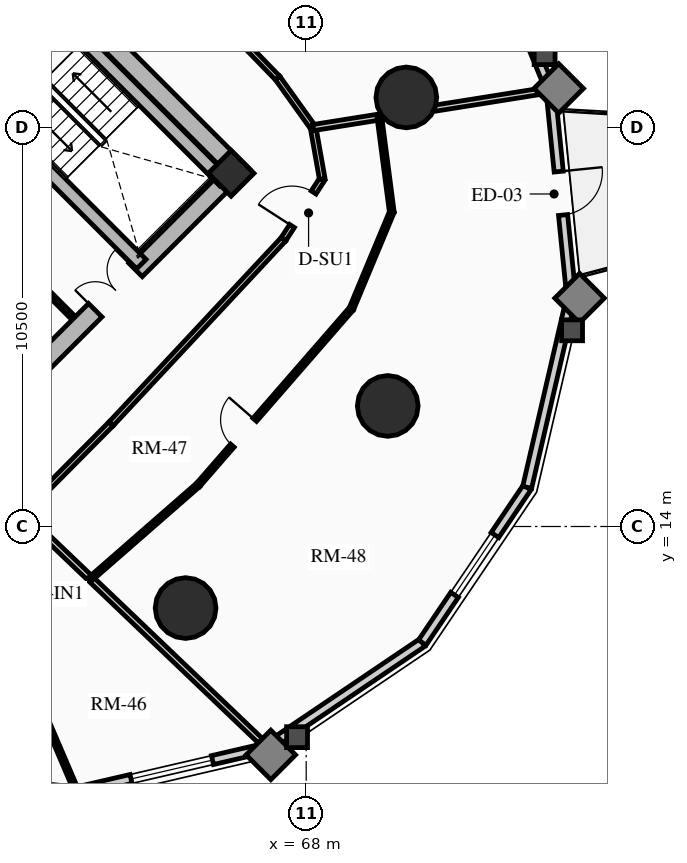
"""IFC4 building model, lengths in metres.
Left out: names, types, materials, properties, quantities, classifications, styles, units other than length and angle.
Written with IfcOpenShell. Run it as: python <this file> out.ifc"""

import sys

from ifc_helpers import new_model, si_unit, direction, frame, frame_2d, origin, origin_2d, place, context, subcontext, project, spatial, rectangle, circle, extrude, source, transform, mapped, element, fill, save


model = new_model("IFC4")
c1 = context("Model", 3, precision=1e-05, world=origin(), true_north=direction((0.0, 1.0)))
c2 = subcontext(c1, "Body", "Model", "MODEL_VIEW")
j1 = project(units=[si_unit("LENGTHUNIT", "METRE"), si_unit("PLANEANGLEUNIT", "RADIAN")], contexts=[c1])
p1 = place(None, origin())
s1 = spatial("IfcSite", under=j1, at=p1, CompositionType="ELEMENT")
p2 = place(p1, origin())
s2 = spatial("IfcBuilding", under=s1, at=p2, CompositionType="ELEMENT")
p3 = place(p2, frame((0.0, 0.0, 48.19)))
s3 = spatial("IfcBuildingStorey", under=s2, at=p3, CompositionType="ELEMENT", Elevation=48.19)
p4 = place(p3, frame((66.339, 23.227, 0.0), z_axis=(0.0, 0.0, 1.0), x_axis=(-0.707106781187, 0.707106781187, 0.0)))
e1 = element("IfcWall", 1, at=p4, inside=s3, PredefinedType="SHEAR", context=c2, shape_type="SweptSolid", body=[
    extrude(rectangle(XDim=14.3, YDim=0.5, at=frame_2d((7.15, 0.0))), origin(), (0.0, 0.0, 1.0), 2.91),
])
p5 = place(p3, frame((58.596, 15.838, 0.0), z_axis=(0.0, 0.0, 1.0), x_axis=(0.707106781187, 0.707106781187, 0.0)))
e2 = element("IfcWall", 2, at=p5, inside=s3, PredefinedType="SHEAR", context=c2, shape_type="SweptSolid", body=[
    extrude(rectangle(XDim=10.7, YDim=0.5, at=frame_2d((5.35, 0.0))), origin(), (0.0, 0.0, 1.0), 2.91),
])
m1 = source(origin(), c2, "Body", "SweptSolid", [
    extrude(rectangle(XDim=1.5, YDim=2.02, at=frame_2d((0.75, 1.01))), frame((0.0, 0.26, 0.0), z_axis=(0.0, -1.0, 0.0), x_axis=(1.0, 0.0, 0.0)), (0.0, 0.0, 1.0), 0.52),
])
p6 = place(p5, frame((5.45, 0.0, 0.0)))
e3 = element("IfcOpeningElement", 3, at=p6, cuts=e2, PredefinedType="OPENING", context=c2, shape_type="MappedRepresentation", body=[
    mapped(m1, transform((0.0, 0.0, 0.0), x_axis=(1.0, 0.0, 0.0), y_axis=(0.0, 1.0, 0.0), z_axis=(0.0, 0.0, 1.0), scale=1.0)),
])
p7 = place(p3, frame((63.662, 20.904, 0.0), z_axis=(0.0, 0.0, 1.0), x_axis=(-0.707106781187, 0.707106781187, 0.0)))
e4 = element("IfcWall", 4, at=p7, inside=s3, PredefinedType="SHEAR", context=c2, shape_type="SweptSolid", body=[
    extrude(rectangle(XDim=13.8, YDim=0.35, at=frame_2d((6.9, 0.0))), origin(), (0.0, 0.0, 1.0), 2.91),
])
m2 = source(origin(), c2, "Body", "SweptSolid", [
    extrude(rectangle(XDim=1.1, YDim=2.015, at=frame_2d((0.55, 1.007))), frame((0.0, 0.185, 0.0), z_axis=(0.0, -1.0, 0.0), x_axis=(1.0, 0.0, 0.0)), (0.0, 0.0, 1.0), 0.37),
])
p8 = place(p7, frame((10.025, 0.0, 0.0)))
e5 = element("IfcOpeningElement", 5, at=p8, cuts=e4, PredefinedType="OPENING", context=c2, shape_type="MappedRepresentation", body=[
    mapped(m2, transform((0.0, 0.0, 0.0), x_axis=(1.0, 0.0, 0.0), y_axis=(0.0, 1.0, 0.0), z_axis=(0.0, 0.0, 1.0), scale=1.0)),
])
p9 = place(p7, frame((12.025, 0.0, 0.0)))
e6 = element("IfcOpeningElement", 6, at=p9, cuts=e4, PredefinedType="OPENING", context=c2, shape_type="MappedRepresentation", body=[
    mapped(m2, transform((0.0, 0.0, 0.0), x_axis=(1.0, 0.0, 0.0), y_axis=(0.0, 1.0, 0.0), z_axis=(0.0, 0.0, 1.0), scale=1.0)),
])
m3 = source(origin(), c2, "Body", "SweptSolid", [
    extrude(rectangle(XDim=1.15, YDim=2.02, at=frame_2d((0.575, 1.01))), frame((0.0, 0.185, 0.0), z_axis=(0.0, -1.0, 0.0), x_axis=(1.0, 0.0, 0.0)), (0.0, 0.0, 1.0), 0.37),
])
p10 = place(p7, frame((5.33, 0.0, 0.0)))
e7 = element("IfcOpeningElement", 7, at=p10, cuts=e4, PredefinedType="OPENING", context=c2, shape_type="MappedRepresentation", body=[
    mapped(m3, transform((0.0, 0.0, 0.0), x_axis=(1.0, 0.0, 0.0), y_axis=(0.0, 1.0, 0.0), z_axis=(0.0, 0.0, 1.0), scale=1.0)),
])
p11 = place(p3, frame((65.847, 23.089, 0.0), z_axis=(0.0, 0.0, 1.0), x_axis=(-0.707106781187, 0.707106781187, 0.0)))
e8 = element("IfcWall", 8, at=p11, inside=s3, PredefinedType="SHEAR", context=c2, shape_type="SweptSolid", body=[
    extrude(rectangle(XDim=6.745, YDim=0.35, at=frame_2d((3.373, 0.0))), origin(), (0.0, 0.0, 1.0), 2.91),
])
p12 = place(p3, frame((58.893, 25.674, 0.0), z_axis=(0.0, 0.0, 1.0), x_axis=(0.707106781187, 0.707106781187, 0.0)))
e9 = element("IfcWall", 9, at=p12, inside=s3, PredefinedType="SHEAR", context=c2, shape_type="SweptSolid", body=[
    extrude(rectangle(XDim=3.285, YDim=0.35, at=frame_2d((1.643, 0.0))), origin(), (0.0, 0.0, 1.0), 2.91),
])
p13 = place(p3, frame((66.024, 23.294, 0.0), z_axis=(0.0, 0.0, 1.0), x_axis=(0.707106781187, 0.707106781187, 0.0)))
e10 = element("IfcColumn", 10, at=p13, inside=s3, PredefinedType="COLUMN", context=c2, shape_type="SweptSolid", body=[
    extrude(rectangle(XDim=0.85, YDim=0.85, at=origin_2d()), origin(), (0.0, 0.0, 1.0), 2.91),
])
for number, where, z_axis, x_axis in (
    (11, (64.827, 11.854, 0.0), (0.0, 0.0, 1.0), (1.0, 0.0, 0.0)),
    (12, (70.146, 17.173, 0.0), (0.0, 0.0, 1.0), (1.0, 0.0, 0.0)),
    (13, (70.635, 25.291, 0.0), (0.0, 0.0, 1.0), (1.0, 0.0, 0.0)),
):
    element("IfcColumn", number, at=place(p3, frame(where, z_axis=z_axis, x_axis=x_axis)), inside=s3, PredefinedType="USERDEFINED", context=c2, shape_type="SweptSolid", body=[
        extrude(circle(Radius=0.8, at=origin_2d()), origin(), (0.0, 0.0, 1.0), 2.91),
    ])
p14 = place(p3, frame((61.957, 7.024, 0.0), z_axis=(0.0, 0.0, 1.0), x_axis=(-0.994970765694, 0.100165739718, 0.0)))
e14 = element("IfcWall", 14, at=p14, inside=s3, PredefinedType="SOLIDWALL", context=c2, shape_type="SweptSolid", body=[
    extrude(rectangle(XDim=5.477, YDim=0.24, at=frame_2d((2.738, 0.0))), origin(), (0.0, 0.0, 1.0), 2.073),
])
m4 = source(origin(), c2, "Body", "SweptSolid", [
    extrude(rectangle(XDim=1.9, YDim=1.35, at=frame_2d((0.95, 0.675))), frame((0.0, 0.13, 0.0), z_axis=(0.0, -1.0, 0.0), x_axis=(1.0, 0.0, 0.0)), (0.0, 0.0, 1.0), 0.26),
])
p15 = place(p14, frame((1.788, 0.0, 0.65)))
e15 = element("IfcOpeningElement", 15, at=p15, cuts=e14, PredefinedType="OPENING", context=c2, shape_type="MappedRepresentation", body=[
    mapped(m4, transform((0.0, 0.0, 0.0), x_axis=(1.0, 0.0, 0.0), y_axis=(0.0, 1.0, 0.0), z_axis=(0.0, 0.0, 1.0), scale=1.0)),
])
p16 = place(p3, frame((66.969, 8.186, 0.0), z_axis=(0.0, 0.0, 1.0), x_axis=(-0.974166016949, -0.225833060959, 0.0)))
e16 = element("IfcWall", 16, at=p16, inside=s3, PredefinedType="SOLIDWALL", context=c2, shape_type="SweptSolid", body=[
    extrude(rectangle(XDim=5.146, YDim=0.24, at=frame_2d((2.573, 0.0))), origin(), (0.0, 0.0, 1.0), 2.073),
])
m5 = source(origin(), c2, "Body", "SweptSolid", [
    extrude(rectangle(XDim=2.2, YDim=1.35, at=frame_2d((1.1, 0.675))), frame((0.0, 0.13, 0.0), z_axis=(0.0, -1.0, 0.0), x_axis=(1.0, 0.0, 0.0)), (0.0, 0.0, 1.0), 0.26),
])
p17 = place(p16, frame((1.473, 0.0, 0.65)))
e17 = element("IfcOpeningElement", 17, at=p17, cuts=e16, PredefinedType="OPENING", context=c2, shape_type="MappedRepresentation", body=[
    mapped(m5, transform((0.0, 0.0, 0.0), x_axis=(1.0, 0.0, 0.0), y_axis=(0.0, 1.0, 0.0), z_axis=(0.0, 0.0, 1.0), scale=1.0)),
])
p18 = place(p3, frame((71.055, 10.945, 0.0), z_axis=(0.0, 0.0, 1.0), x_axis=(-0.828736708604, -0.559638693991, 0.0)))
e18 = element("IfcWall", 18, at=p18, inside=s3, PredefinedType="SOLIDWALL", context=c2, shape_type="SweptSolid", body=[
    extrude(rectangle(XDim=4.93, YDim=0.24, at=frame_2d((2.465, 0.0))), origin(), (0.0, 0.0, 1.0), 2.073),
])
p19 = place(p3, frame((73.814, 15.031, 0.0), z_axis=(0.0, 0.0, 1.0), x_axis=(-0.559638693991, -0.828736708604, 0.0)))
e19 = element("IfcWall", 19, at=p19, inside=s3, PredefinedType="SOLIDWALL", context=c2, shape_type="SweptSolid", body=[
    extrude(rectangle(XDim=4.93, YDim=0.24, at=frame_2d((2.465, 0.0))), origin(), (0.0, 0.0, 1.0), 2.073),
])
p20 = place(p19, frame((1.515, 0.0, 0.65)))
e20 = element("IfcOpeningElement", 20, at=p20, cuts=e19, PredefinedType="OPENING", context=c2, shape_type="MappedRepresentation", body=[
    mapped(m4, transform((0.0, 0.0, 0.0), x_axis=(1.0, 0.0, 0.0), y_axis=(0.0, 1.0, 0.0), z_axis=(0.0, 0.0, 1.0), scale=1.0)),
])
p21 = place(p3, frame((74.976, 20.043, 0.0), z_axis=(0.0, 0.0, 1.0), x_axis=(-0.225833060959, -0.974166016949, 0.0)))
e21 = element("IfcWall", 21, at=p21, inside=s3, PredefinedType="SOLIDWALL", context=c2, shape_type="SweptSolid", body=[
    extrude(rectangle(XDim=5.146, YDim=0.24, at=frame_2d((2.573, 0.0))), origin(), (0.0, 0.0, 1.0), 2.073),
])
p22 = place(p3, frame((74.428, 25.493, 0.0), z_axis=(0.0, 0.0, 1.0), x_axis=(0.100165739718, -0.994970765694, 0.0)))
e22 = element("IfcWall", 22, at=p22, inside=s3, PredefinedType="SOLIDWALL", context=c2, shape_type="SweptSolid", body=[
    extrude(rectangle(XDim=5.477, YDim=0.24, at=frame_2d((2.738, 0.0))), origin(), (0.0, 0.0, 1.0), 2.073),
])
m6 = source(origin(), c2, "Body", "SweptSolid", [
    extrude(rectangle(XDim=1.15, YDim=2.005, at=frame_2d((0.575, 1.002))), frame((0.0, 0.13, 0.0), z_axis=(0.0, -1.0, 0.0), x_axis=(1.0, 0.0, 0.0)), (0.0, 0.0, 1.0), 0.26),
])
p23 = place(p22, frame((2.163, 0.0, 0.0)))
e23 = element("IfcOpeningElement", 23, at=p23, cuts=e22, PredefinedType="OPENING", context=c2, shape_type="MappedRepresentation", body=[
    mapped(m6, transform((0.0, 0.0, 0.0), x_axis=(1.0, 0.0, 0.0), y_axis=(0.0, 1.0, 0.0), z_axis=(0.0, 0.0, 1.0), scale=1.0)),
])
p24 = place(p3, frame((72.222, 30.844, 0.0), z_axis=(0.0, 0.0, 1.0), x_axis=(0.381027682565, -0.924563629567, 0.0)))
e24 = element("IfcWall", 24, at=p24, inside=s3, PredefinedType="SOLIDWALL", context=c2, shape_type="SweptSolid", body=[
    extrude(rectangle(XDim=5.789, YDim=0.24, at=frame_2d((2.894, 0.0))), origin(), (0.0, 0.0, 1.0), 2.073),
])
p25 = place(p3, frame((61.835, 19.529, 0.0), z_axis=(0.0, 0.0, 1.0), x_axis=(-0.707146413884, 0.707067146267, 0.0)))
e25 = element("IfcWall", 25, at=p25, inside=s3, PredefinedType="PARTITIONING", context=c2, shape_type="SweptSolid", body=[
    extrude(rectangle(XDim=3.08, YDim=0.125, at=frame_2d((1.54, 0.0))), origin(), (0.0, 0.0, 1.0), 2.635),
])
m7 = source(origin(), c2, "Body", "SweptSolid", [
    extrude(rectangle(XDim=0.9, YDim=2.005, at=frame_2d((0.45, 1.002))), frame((0.0, 0.073, 0.0), z_axis=(0.0, -1.0, 0.0), x_axis=(1.0, 0.0, 0.0)), (0.0, 0.0, 1.0), 0.145),
])
p26 = place(p25, frame((1.05, 0.0, 0.0)))
e26 = element("IfcOpeningElement", 26, at=p26, cuts=e25, PredefinedType="OPENING", context=c2, shape_type="MappedRepresentation", body=[
    mapped(m7, transform((0.0, 0.0, 0.0), x_axis=(1.0, 0.0, 0.0), y_axis=(0.0, 1.0, 0.0), z_axis=(0.0, 0.0, 1.0), scale=1.0)),
])
p27 = place(p3, frame((60.528, 14.344, 0.0), z_axis=(0.0, 0.0, 1.0), x_axis=(0.704381645997, 0.709821454158, 0.0)))
e27 = element("IfcWall", 27, at=p27, inside=s3, PredefinedType="PARTITIONING", context=c2, shape_type="SweptSolid", body=[
    extrude(rectangle(XDim=3.321, YDim=0.15, at=frame_2d((1.661, 0.0))), origin(), (0.0, 0.0, 1.0), 2.159),
])
p28 = place(p3, frame((62.867, 16.702, 0.0), z_axis=(0.0, 0.0, 1.0), x_axis=(0.682449206191, 0.73093302085, 0.0)))
e28 = element("IfcWall", 28, at=p28, inside=s3, PredefinedType="PARTITIONING", context=c2, shape_type="SweptSolid", body=[
    extrude(rectangle(XDim=6.642, YDim=0.15, at=frame_2d((3.321, 0.0))), origin(), (0.0, 0.0, 1.0), 2.159),
])
p29 = place(p3, frame((67.4, 21.556, 0.0), z_axis=(0.0, 0.0, 1.0), x_axis=(0.542247692187, 0.840218686009, 0.0)))
e29 = element("IfcWall", 29, at=p29, inside=s3, PredefinedType="PARTITIONING", context=c2, shape_type="SweptSolid", body=[
    extrude(rectangle(XDim=1.887, YDim=0.15, at=frame_2d((0.943, 0.0))), origin(), (0.0, 0.0, 1.0), 2.205),
])
m8 = source(origin(), c2, "Body", "SweptSolid", [
    extrude(rectangle(XDim=1.05, YDim=2.015, at=frame_2d((0.525, 1.007))), frame((0.0, 0.085, 0.0), z_axis=(0.0, -1.0, 0.0), x_axis=(1.0, 0.0, 0.0)), (0.0, 0.0, 1.0), 0.17),
])
p30 = place(p29, frame((0.419, 0.0, 0.0)))
e30 = element("IfcOpeningElement", 30, at=p30, cuts=e29, PredefinedType="OPENING", context=c2, shape_type="MappedRepresentation", body=[
    mapped(m8, transform((0.0, 0.0, 0.0), x_axis=(1.0, 0.0, 0.0), y_axis=(0.0, 1.0, 0.0), z_axis=(0.0, 0.0, 1.0), scale=1.0)),
])
p31 = place(p3, frame((68.423, 23.142, 0.0), z_axis=(0.0, 0.0, 1.0), x_axis=(-0.174796562349, 0.984604571283, 0.0)))
e31 = element("IfcWall", 31, at=p31, inside=s3, PredefinedType="PARTITIONING", context=c2, shape_type="SweptSolid", body=[
    extrude(rectangle(XDim=1.377, YDim=0.15, at=frame_2d((0.688, 0.0))), origin(), (0.0, 0.0, 1.0), 2.159),
])
p32 = place(p3, frame((68.182, 24.498, 0.0), z_axis=(0.0, 0.0, 1.0), x_axis=(-0.582532339525, 0.812807525437, 0.0)))
e32 = element("IfcWall", 32, at=p32, inside=s3, PredefinedType="PARTITIONING", context=c2, shape_type="SweptSolid", body=[
    extrude(rectangle(XDim=1.605, YDim=0.15, at=frame_2d((0.803, 0.0))), origin(), (0.0, 0.0, 1.0), 2.205),
])
p33 = place(p3, frame((67.247, 25.802, 0.0), z_axis=(0.0, 0.0, 1.0), x_axis=(-0.696771261687, 0.71729339108, 0.0)))
e33 = element("IfcWall", 33, at=p33, inside=s3, PredefinedType="PARTITIONING", context=c2, shape_type="SweptSolid", body=[
    extrude(rectangle(XDim=5.972, YDim=0.15, at=frame_2d((2.986, 0.0))), origin(), (0.0, 0.0, 1.0), 2.635),
])
m9 = source(origin(), c2, "Body", "SweptSolid", [
    extrude(rectangle(XDim=1.0, YDim=2.015, at=frame_2d((0.5, 1.007))), frame((0.0, 0.085, 0.0), z_axis=(0.0, -1.0, 0.0), x_axis=(1.0, 0.0, 0.0)), (0.0, 0.0, 1.0), 0.17),
])
p34 = place(p33, frame((2.486, 0.0, 0.0)))
e34 = element("IfcOpeningElement", 34, at=p34, cuts=e33, PredefinedType="OPENING", context=c2, shape_type="MappedRepresentation", body=[
    mapped(m9, transform((0.0, 0.0, 0.0), x_axis=(1.0, 0.0, 0.0), y_axis=(0.0, 1.0, 0.0), z_axis=(0.0, 0.0, 1.0), scale=1.0)),
])
p35 = place(p3, frame((60.528, 14.344, 0.0), z_axis=(0.0, 0.0, 1.0), x_axis=(0.723320016743, -0.690512963947, 0.0)))
e35 = element("IfcWall", 35, at=p35, inside=s3, PredefinedType="PARTITIONING", context=c2, shape_type="SweptSolid", body=[
    extrude(rectangle(XDim=8.893, YDim=0.16, at=frame_2d((4.446, 0.0))), origin(), (0.0, 0.0, 1.0), 2.073),
])
p36 = place(p3, frame((68.182, 24.498, 0.0), z_axis=(0.0, 0.0, 1.0), x_axis=(0.987550107246, 0.157304754152, 0.0)))
e36 = element("IfcWall", 36, at=p36, inside=s3, PredefinedType="PARTITIONING", context=c2, shape_type="SweptSolid", body=[
    extrude(rectangle(XDim=6.304, YDim=0.16, at=frame_2d((3.152, 0.0))), origin(), (0.0, 0.0, 1.0), 2.073),
])
p37 = place(p3, frame((58.975, 13.996, 0.0), z_axis=(0.0, 0.0, 1.0), x_axis=(0.393755664375, -0.919215141723, 0.0)))
e37 = element("IfcWall", 37, at=p37, inside=s3, PredefinedType="PARTITIONING", context=c2, shape_type="SweptSolid", body=[
    extrude(rectangle(XDim=7.563, YDim=0.125, at=frame_2d((3.782, 0.0))), origin(), (0.0, 0.0, 1.0), 2.073),
])
p38 = place(p37, frame((1.8, 0.0, 0.0)))
e38 = element("IfcOpeningElement", 38, at=p38, cuts=e37, PredefinedType="OPENING", context=c2, shape_type="MappedRepresentation", body=[
    mapped(m7, transform((0.0, 0.0, 0.0), x_axis=(1.0, 0.0, 0.0), y_axis=(0.0, 1.0, 0.0), z_axis=(0.0, 0.0, 1.0), scale=1.0)),
])
p39 = place(p3, frame((62.329, 12.625, 0.0), z_axis=(0.0, 0.0, 1.0), x_axis=(0.753237140985, 0.657749047465, 0.0)))
e39 = element("IfcWall", 39, at=p39, inside=s3, PredefinedType="PARTITIONING", context=c2, shape_type="SweptSolid", body=[
    extrude(rectangle(XDim=3.753, YDim=0.125, at=frame_2d((1.877, 0.0))), origin(), (0.0, 0.0, 1.0), 2.159),
])
p40 = place(p3, frame((65.156, 15.094, 0.0), z_axis=(0.0, 0.0, 1.0), x_axis=(0.656356662483, 0.754450748302, 0.0)))
e40 = element("IfcWall", 40, at=p40, inside=s3, PredefinedType="PARTITIONING", context=c2, shape_type="SweptSolid", body=[
    extrude(rectangle(XDim=6.147, YDim=0.125, at=frame_2d((3.074, 0.0))), origin(), (0.0, 0.0, 1.0), 2.159),
])
p41 = place(p40, frame((1.372, 0.0, 0.0)))
e41 = element("IfcOpeningElement", 41, at=p41, cuts=e40, PredefinedType="OPENING", context=c2, shape_type="MappedRepresentation", body=[
    mapped(m7, transform((0.0, 0.0, 0.0), x_axis=(1.0, 0.0, 0.0), y_axis=(0.0, 1.0, 0.0), z_axis=(0.0, 0.0, 1.0), scale=1.0)),
])
p42 = place(p3, frame((69.191, 19.732, 0.0), z_axis=(0.0, 0.0, 1.0), x_axis=(0.385156247749, 0.922851377427, 0.0)))
e42 = element("IfcWall", 42, at=p42, inside=s3, PredefinedType="PARTITIONING", context=c2, shape_type="SweptSolid", body=[
    extrude(rectangle(XDim=2.756, YDim=0.125, at=frame_2d((1.378, 0.0))), origin(), (0.0, 0.0, 1.0), 2.205),
])
p43 = place(p3, frame((70.252, 22.275, 0.0), z_axis=(0.0, 0.0, 1.0), x_axis=(-0.129645482902, 0.991560411051, 0.0)))
e43 = element("IfcWall", 43, at=p43, inside=s3, PredefinedType="PARTITIONING", context=c2, shape_type="SweptSolid", body=[
    extrude(rectangle(XDim=2.521, YDim=0.125, at=frame_2d((1.261, 0.0))), origin(), (0.0, 0.0, 1.0), 2.635),
])
m10 = source(origin(), c2, "Body", "SweptSolid", [
    extrude(rectangle(XDim=2.2, YDim=1.35, at=frame_2d((1.1, 0.675))), frame((0.0, 0.03, 0.0), z_axis=(0.0, -1.0, 0.0), x_axis=(1.0, 0.0, 0.0)), (0.0, 0.0, 1.0), 0.06),
])
p44 = place(p17, origin())
e44 = element("IfcWindow", 44, at=p44, inside=s3, PartitioningType="DOUBLE_PANEL_VERTICAL", PredefinedType="WINDOW", context=c2, shape_type="MappedRepresentation", body=[
    mapped(m10, transform((0.0, 0.0, 0.0), x_axis=(1.0, 0.0, 0.0), y_axis=(0.0, 1.0, 0.0), z_axis=(0.0, 0.0, 1.0), scale=1.0)),
])
fill(e17, e44)
m11 = source(origin(), c2, "Body", "SweptSolid", [
    extrude(rectangle(XDim=1.9, YDim=1.35, at=frame_2d((0.95, 0.675))), frame((0.0, 0.03, 0.0), z_axis=(0.0, -1.0, 0.0), x_axis=(1.0, 0.0, 0.0)), (0.0, 0.0, 1.0), 0.06),
])
p45 = place(p20, origin())
e45 = element("IfcWindow", 45, at=p45, inside=s3, PartitioningType="DOUBLE_PANEL_VERTICAL", PredefinedType="WINDOW", context=c2, shape_type="MappedRepresentation", body=[
    mapped(m11, transform((0.0, 0.0, 0.0), x_axis=(1.0, 0.0, 0.0), y_axis=(0.0, 1.0, 0.0), z_axis=(0.0, 0.0, 1.0), scale=1.0)),
])
fill(e20, e45)
m12 = source(origin(), c2, "Body", "SweptSolid", [
    extrude(rectangle(XDim=1.15, YDim=2.005, at=frame_2d((0.575, 1.002))), frame((0.0, 0.025, 0.0), z_axis=(0.0, -1.0, 0.0), x_axis=(1.0, 0.0, 0.0)), (0.0, 0.0, 1.0), 0.05),
])
p46 = place(p23, origin())
e46 = element("IfcDoor", 46, at=p46, inside=s3, OperationType="SINGLE_SWING_LEFT", PredefinedType="DOOR", context=c2, shape_type="MappedRepresentation", body=[
    mapped(m12, transform((0.0, 0.0, 0.0), x_axis=(1.0, 0.0, 0.0), y_axis=(0.0, 1.0, 0.0), z_axis=(0.0, 0.0, 1.0), scale=1.0)),
])
fill(e23, e46)
m13 = source(origin(), c2, "Body", "SweptSolid", [
    extrude(rectangle(XDim=1.5, YDim=2.02, at=frame_2d((0.75, 1.01))), frame((0.0, 0.025, 0.0), z_axis=(0.0, -1.0, 0.0), x_axis=(1.0, 0.0, 0.0)), (0.0, 0.0, 1.0), 0.05),
])
p47 = place(p6, origin())
e47 = element("IfcDoor", 47, at=p47, inside=s3, OperationType="DOUBLE_DOOR_SINGLE_SWING", PredefinedType="DOOR", context=c2, shape_type="MappedRepresentation", body=[
    mapped(m13, transform((0.0, 0.0, 0.0), x_axis=(1.0, 0.0, 0.0), y_axis=(0.0, 1.0, 0.0), z_axis=(0.0, 0.0, 1.0), scale=1.0)),
])
fill(e3, e47)
m14 = source(origin(), c2, "Body", "SweptSolid", [
    extrude(rectangle(XDim=1.05, YDim=2.015, at=frame_2d((0.525, 1.007))), frame((0.0, 0.025, 0.0), z_axis=(0.0, -1.0, 0.0), x_axis=(1.0, 0.0, 0.0)), (0.0, 0.0, 1.0), 0.05),
])
p48 = place(p30, origin())
e48 = element("IfcDoor", 48, at=p48, inside=s3, OperationType="SINGLE_SWING_LEFT", PredefinedType="DOOR", context=c2, shape_type="MappedRepresentation", body=[
    mapped(m14, transform((0.0, 0.0, 0.0), x_axis=(1.0, 0.0, 0.0), y_axis=(0.0, 1.0, 0.0), z_axis=(0.0, 0.0, 1.0), scale=1.0)),
])
fill(e30, e48)
m15 = source(origin(), c2, "Body", "SweptSolid", [
    extrude(rectangle(XDim=0.9, YDim=2.005, at=frame_2d((0.45, 1.002))), frame((0.0, 0.025, 0.0), z_axis=(0.0, -1.0, 0.0), x_axis=(1.0, 0.0, 0.0)), (0.0, 0.0, 1.0), 0.05),
])
p49 = place(p41, origin())
e49 = element("IfcDoor", 49, at=p49, inside=s3, OperationType="SINGLE_SWING_RIGHT", PredefinedType="DOOR", context=c2, shape_type="MappedRepresentation", body=[
    mapped(m15, transform((0.0, 0.0, 0.0), x_axis=(1.0, 0.0, 0.0), y_axis=(0.0, 1.0, 0.0), z_axis=(0.0, 0.0, 1.0), scale=1.0)),
])
fill(e41, e49)
save(model, sys.argv[1])
